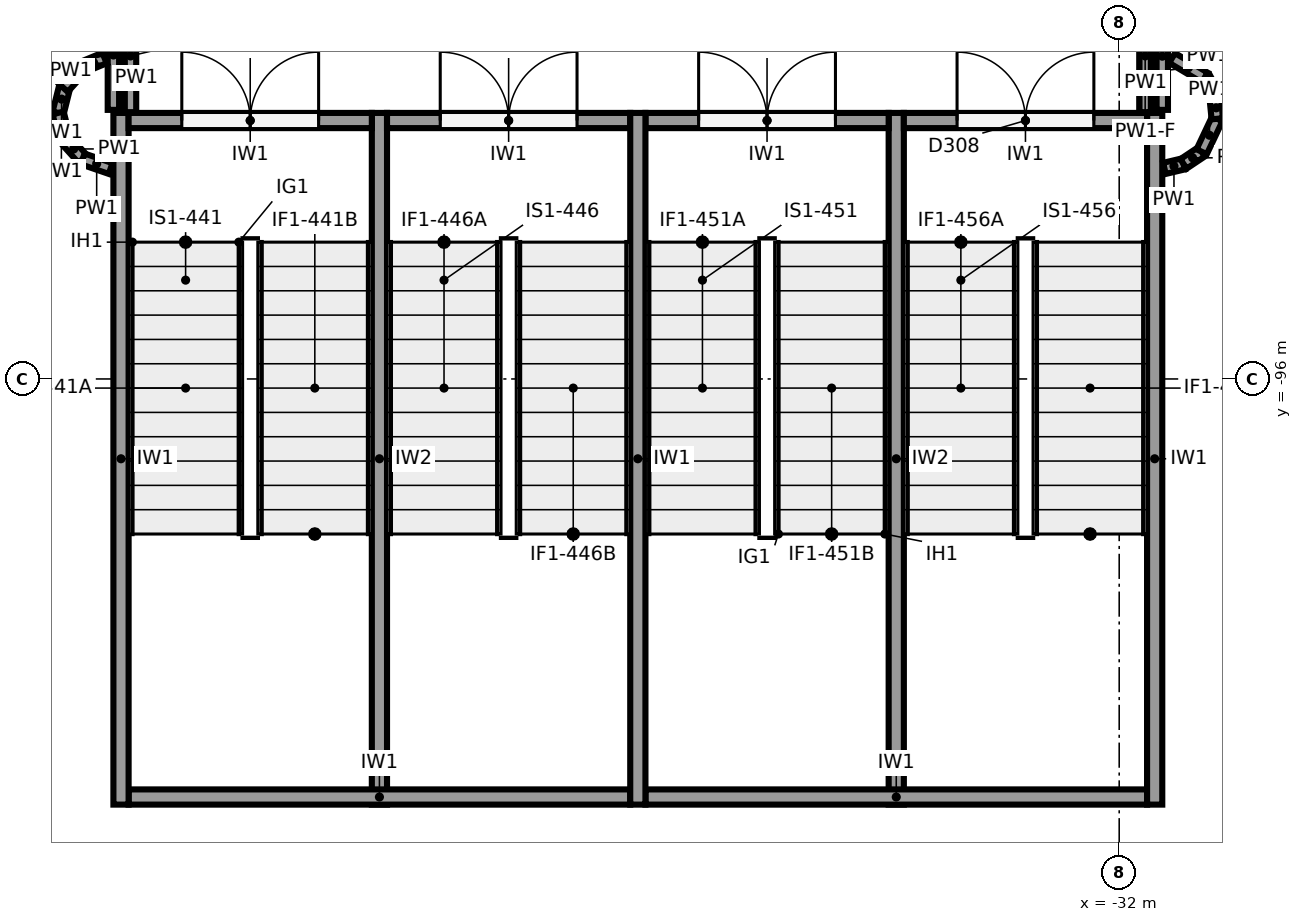
"""IFC4 building model, lengths in metres.
Left out: names, types, materials, properties, quantities, classifications, styles, units other than length and angle.
Written with IfcOpenShell. Run it as: python <this file> out.ifc"""

import sys

from ifc_helpers import new_model, si_unit, direction, frame, frame_2d, origin, place, context, subcontext, project, spatial, rectangle, extrude, element, fill, save


model = new_model("IFC4")
c1 = context("Model", 3, precision=1e-05, world=origin(), true_north=direction((0.0, 1.0)))
c2 = subcontext(c1, "Body", "Model", "MODEL_VIEW")
j1 = project(units=[si_unit("LENGTHUNIT", "METRE"), si_unit("PLANEANGLEUNIT", "RADIAN")], contexts=[c1])
p1 = place(None, origin())
s1 = spatial("IfcSite", under=j1, at=p1, CompositionType="ELEMENT")
p2 = place(p1, origin())
s2 = spatial("IfcBuilding", under=s1, at=p2, CompositionType="ELEMENT")
p3 = place(p2, frame((0.0, 0.0, -4.0)))
s3 = spatial("IfcBuildingStorey", under=s2, at=p3, CompositionType="ELEMENT", Elevation=-4.0)
for number, where, z_axis, x_axis in (
    (1, (-45.133, -101.6, -1.2), (0.0, 0.0, 1.0), (0.0, 1.0, 0.0)),
    (2, (-38.333, -101.6, -1.2), (0.0, 0.0, 1.0), (0.0, 1.0, 0.0)),
    (3, (-31.533, -101.6, -1.2), (0.0, 0.0, 1.0), (0.0, 1.0, 0.0)),
):
    element("IfcWall", number, at=place(p3, frame(where, z_axis=z_axis, x_axis=x_axis)), inside=s3, PredefinedType="SHEAR", context=c2, shape_type="SweptSolid", body=[
        extrude(rectangle(XDim=9.1, YDim=0.2, at=frame_2d((4.55, 0.0))), origin(), (0.0, 0.0, 1.0), 4.8),
    ])
p4 = place(p3, frame((-45.033, -101.5, -1.2), z_axis=(0.0, 0.0, 1.0), x_axis=(1.0, 0.0, 0.0)))
e4 = element("IfcWall", 4, at=p4, inside=s3, PredefinedType="SHEAR", context=c2, shape_type="SweptSolid", body=[
    extrude(rectangle(XDim=6.6, YDim=0.2, at=frame_2d((3.3, 0.0))), origin(), (0.0, 0.0, 1.0), 4.8),
])
p5 = place(p3, frame((-38.233, -101.5, -1.2), z_axis=(0.0, 0.0, 1.0), x_axis=(1.0, 0.0, 0.0)))
e5 = element("IfcWall", 5, at=p5, inside=s3, PredefinedType="SHEAR", context=c2, shape_type="SweptSolid", body=[
    extrude(rectangle(XDim=6.6, YDim=0.2, at=frame_2d((3.3, 0.0))), origin(), (0.0, 0.0, 1.0), 4.8),
])
for number, where, z_axis, x_axis in (
    (6, (-41.733, -101.6, -1.2), (0.0, 0.0, 1.0), (0.0, 1.0, 0.0)),
    (7, (-34.933, -101.6, -1.2), (0.0, 0.0, 1.0), (0.0, 1.0, 0.0)),
):
    element("IfcWall", number, at=place(p3, frame(where, z_axis=z_axis, x_axis=x_axis)), inside=s3, PredefinedType="SHEAR", context=c2, shape_type="SweptSolid", body=[
        extrude(rectangle(XDim=9.1, YDim=0.2, at=frame_2d((4.55, 0.0))), origin(), (0.0, 0.0, 1.0), 4.8),
    ])
p6 = place(p3, frame((-45.033, -92.6, -1.2), z_axis=(0.0, 0.0, 1.0), x_axis=(1.0, 0.0, 0.0)))
e8 = element("IfcWall", 8, at=p6, inside=s3, PredefinedType="SHEAR", context=c2, shape_type="SweptSolid", body=[
    extrude(rectangle(XDim=3.2, YDim=0.2, at=frame_2d((1.6, 0.0))), origin(), (0.0, 0.0, 1.0), 4.8),
])
p7 = place(p6, frame((0.7, 0.0, 1.2)))
e9 = element("IfcOpeningElement", 9, at=p7, cuts=e8, PredefinedType="OPENING", context=c2, shape_type="SweptSolid", body=[
    extrude(rectangle(XDim=1.8, YDim=2.1, at=frame_2d((0.9, 1.05))), frame((0.0, 0.11, 0.0), z_axis=(0.0, -1.0, 0.0), x_axis=(1.0, 0.0, 0.0)), (0.0, 0.0, 1.0), 0.22),
])
p8 = place(p3, frame((-41.633, -92.6, -1.2), z_axis=(0.0, 0.0, 1.0), x_axis=(1.0, 0.0, 0.0)))
e10 = element("IfcWall", 10, at=p8, inside=s3, PredefinedType="SHEAR", context=c2, shape_type="SweptSolid", body=[
    extrude(rectangle(XDim=3.2, YDim=0.2, at=frame_2d((1.6, 0.0))), origin(), (0.0, 0.0, 1.0), 4.8),
])
p9 = place(p8, frame((0.7, 0.0, 1.2)))
e11 = element("IfcOpeningElement", 11, at=p9, cuts=e10, PredefinedType="OPENING", context=c2, shape_type="SweptSolid", body=[
    extrude(rectangle(XDim=1.8, YDim=2.1, at=frame_2d((0.9, 1.05))), frame((0.0, 0.11, 0.0), z_axis=(0.0, -1.0, 0.0), x_axis=(1.0, 0.0, 0.0)), (0.0, 0.0, 1.0), 0.22),
])
p10 = place(p3, frame((-38.233, -92.6, -1.2), z_axis=(0.0, 0.0, 1.0), x_axis=(1.0, 0.0, 0.0)))
e12 = element("IfcWall", 12, at=p10, inside=s3, PredefinedType="SHEAR", context=c2, shape_type="SweptSolid", body=[
    extrude(rectangle(XDim=3.2, YDim=0.2, at=frame_2d((1.6, 0.0))), origin(), (0.0, 0.0, 1.0), 4.8),
])
p11 = place(p10, frame((0.7, 0.0, 1.2)))
e13 = element("IfcOpeningElement", 13, at=p11, cuts=e12, PredefinedType="OPENING", context=c2, shape_type="SweptSolid", body=[
    extrude(rectangle(XDim=1.8, YDim=2.1, at=frame_2d((0.9, 1.05))), frame((0.0, 0.11, 0.0), z_axis=(0.0, -1.0, 0.0), x_axis=(1.0, 0.0, 0.0)), (0.0, 0.0, 1.0), 0.22),
])
p12 = place(p3, frame((-34.833, -92.6, -1.2), z_axis=(0.0, 0.0, 1.0), x_axis=(1.0, 0.0, 0.0)))
e14 = element("IfcWall", 14, at=p12, inside=s3, PredefinedType="SHEAR", context=c2, shape_type="SweptSolid", body=[
    extrude(rectangle(XDim=3.2, YDim=0.2, at=frame_2d((1.6, 0.0))), origin(), (0.0, 0.0, 1.0), 4.8),
])
p13 = place(p12, frame((0.7, 0.0, 1.2)))
e15 = element("IfcOpeningElement", 15, at=p13, cuts=e14, PredefinedType="OPENING", context=c2, shape_type="SweptSolid", body=[
    extrude(rectangle(XDim=1.8, YDim=2.1, at=frame_2d((0.9, 1.05))), frame((0.0, 0.11, 0.0), z_axis=(0.0, -1.0, 0.0), x_axis=(1.0, 0.0, 0.0)), (0.0, 0.0, 1.0), 0.22),
])
p14 = place(p3, frame((-45.233, -91.016, 0.0), z_axis=(0.0, 0.0, 1.0), x_axis=(0.0, -1.0, 0.0)))
e16 = element("IfcWall", 16, at=p14, inside=s3, PredefinedType="PARTITIONING", context=c2, shape_type="SweptSolid", body=[
    extrude(rectangle(XDim=1.444, YDim=0.15, at=frame_2d((0.722, 0.0))), origin(), (0.0, 0.0, 1.0), 3.6),
])
p15 = place(p3, frame((-31.433, -92.46, 0.0), z_axis=(0.0, 0.0, 1.0), x_axis=(0.0, 1.0, 0.0)))
e17 = element("IfcWall", 17, at=p15, inside=s3, PredefinedType="PARTITIONING", context=c2, shape_type="SweptSolid", body=[
    extrude(rectangle(XDim=1.413, YDim=0.15, at=frame_2d((0.706, 0.0))), origin(), (0.0, 0.0, 1.0), 3.6),
])
p16 = place(p3, frame((-31.658, -92.49, 0.0), z_axis=(0.0, 0.0, 1.0), x_axis=(0.0, 1.0, 0.0)))
e18 = element("IfcWall", 18, at=p16, inside=s3, PredefinedType="PARTITIONING", context=c2, shape_type="SweptSolid", body=[
    extrude(rectangle(XDim=2.465, YDim=0.15, at=frame_2d((1.232, 0.0))), origin(), (0.0, 0.0, 1.0), 2.5),
])
p17 = place(p3, frame((-31.658, -92.49, 2.5), z_axis=(0.0, 0.0, 1.0), x_axis=(0.0, 1.0, 0.0)))
e19 = element("IfcWall", 19, at=p17, inside=s3, PredefinedType="PARTITIONING", context=c2, shape_type="SweptSolid", body=[
    extrude(rectangle(XDim=1.479, YDim=0.15, at=frame_2d((0.74, 0.0))), origin(), (0.0, 0.0, 1.0), 1.1),
])
p18 = place(p3, frame((-45.008, -91.011, 0.0), z_axis=(0.0, 0.0, 1.0), x_axis=(0.0, -1.0, 0.0)))
e20 = element("IfcWall", 20, at=p18, inside=s3, PredefinedType="PARTITIONING", context=c2, shape_type="SweptSolid", body=[
    extrude(rectangle(XDim=1.479, YDim=0.15, at=frame_2d((0.74, 0.0))), origin(), (0.0, 0.0, 1.0), 3.6),
])
p19 = place(p3, frame((-45.87, -92.137, 0.0), z_axis=(0.0, 0.0, 1.0), x_axis=(-0.243149105267, -0.969988923961, 0.0)))
e21 = element("IfcWall", 21, at=p19, inside=s3, PredefinedType="PARTITIONING", context=c2, shape_type="SweptSolid", body=[
    extrude(rectangle(XDim=0.375, YDim=0.15, at=frame_2d((0.187, 0.0))), origin(), (0.0, 0.0, 1.0), 3.6),
])
p20 = place(p3, frame((-45.961, -92.5, 0.0), z_axis=(0.0, 0.0, 1.0), x_axis=(0.243185799972, -0.969979724887, 0.0)))
e22 = element("IfcWall", 22, at=p20, inside=s3, PredefinedType="PARTITIONING", context=c2, shape_type="SweptSolid", body=[
    extrude(rectangle(XDim=0.353, YDim=0.15, at=frame_2d((0.177, 0.0))), origin(), (0.0, 0.0, 1.0), 3.6),
])
p21 = place(p3, frame((-45.875, -92.843, 0.0), z_axis=(0.0, 0.0, 1.0), x_axis=(0.671779735796, -0.740750961237, 0.0)))
e23 = element("IfcWall", 23, at=p21, inside=s3, PredefinedType="PARTITIONING", context=c2, shape_type="SweptSolid", body=[
    extrude(rectangle(XDim=0.354, YDim=0.15, at=frame_2d((0.177, 0.0))), origin(), (0.0, 0.0, 1.0), 3.6),
])
p22 = place(p3, frame((-45.637, -93.105, 0.0), z_axis=(0.0, 0.0, 1.0), x_axis=(0.945426446164, -0.325835594885, 0.0)))
e24 = element("IfcWall", 24, at=p22, inside=s3, PredefinedType="PARTITIONING", context=c2, shape_type="SweptSolid", body=[
    extrude(rectangle(XDim=0.388, YDim=0.15, at=frame_2d((0.194, 0.0))), origin(), (0.0, 0.0, 1.0), 3.6),
])
p23 = place(p3, frame((-31.405, -93.23, 0.0), z_axis=(0.0, 0.0, 1.0), x_axis=(0.973130593004, 0.230253879357, 0.0)))
e25 = element("IfcWall", 25, at=p23, inside=s3, PredefinedType="PARTITIONING", context=c2, shape_type="SweptSolid", body=[
    extrude(rectangle(XDim=0.258, YDim=0.15, at=frame_2d((0.129, 0.0))), origin(), (0.0, 0.0, 1.0), 3.6),
])
p24 = place(p3, frame((-31.154, -93.17, 0.0), z_axis=(0.0, 0.0, 1.0), x_axis=(0.831397130511, 0.555678694372, 0.0)))
e26 = element("IfcWall", 26, at=p24, inside=s3, PredefinedType="PARTITIONING", context=c2, shape_type="SweptSolid", body=[
    extrude(rectangle(XDim=0.288, YDim=0.15, at=frame_2d((0.144, 0.0))), origin(), (0.0, 0.0, 1.0), 3.6),
])
p25 = place(p3, frame((-30.915, -93.01, 0.0), z_axis=(0.0, 0.0, 1.0), x_axis=(0.427757963167, 0.903893315025, 0.0)))
e27 = element("IfcWall", 27, at=p25, inside=s3, PredefinedType="PARTITIONING", context=c2, shape_type="SweptSolid", body=[
    extrude(rectangle(XDim=0.479, YDim=0.15, at=frame_2d((0.24, 0.0))), origin(), (0.0, 0.0, 1.0), 3.6),
])
p26 = place(p3, frame((-30.71, -92.577, 0.0), z_axis=(0.0, 0.0, 1.0), x_axis=(-0.0978334953, 0.99520279702, 0.0)))
e28 = element("IfcWall", 28, at=p26, inside=s3, PredefinedType="PARTITIONING", context=c2, shape_type="SweptSolid", body=[
    extrude(rectangle(XDim=0.29, YDim=0.15, at=frame_2d((0.145, 0.0))), origin(), (0.0, 0.0, 1.0), 3.6),
])
p27 = place(p3, frame((-30.738, -92.289, 0.0), z_axis=(0.0, 0.0, 1.0), x_axis=(-0.471682765858, 0.881768319, 0.0)))
e29 = element("IfcWall", 29, at=p27, inside=s3, PredefinedType="PARTITIONING", context=c2, shape_type="SweptSolid", body=[
    extrude(rectangle(XDim=0.289, YDim=0.15, at=frame_2d((0.145, 0.0))), origin(), (0.0, 0.0, 1.0), 3.6),
])
p28 = place(p3, frame((-30.875, -92.034, 0.0), z_axis=(0.0, 0.0, 1.0), x_axis=(-0.85856712863, 0.512701166017, 0.0)))
e30 = element("IfcWall", 30, at=p28, inside=s3, PredefinedType="PARTITIONING", context=c2, shape_type="SweptSolid", body=[
    extrude(rectangle(XDim=0.5, YDim=0.15, at=frame_2d((0.25, 0.0))), origin(), (0.0, 0.0, 1.0), 3.6),
])
p29 = place(p3, frame((-45.35, -91.778, 0.0), z_axis=(0.0, 0.0, 1.0), x_axis=(-0.924710471816, -0.380671174788, 0.0)))
e31 = element("IfcWall", 31, at=p29, inside=s3, PredefinedType="PARTITIONING", context=c2, shape_type="SweptSolid", body=[
    extrude(rectangle(XDim=0.312, YDim=0.15, at=frame_2d((0.156, 0.0))), origin(), (0.0, 0.0, 1.0), 3.6),
])
p30 = place(p3, frame((-45.639, -91.896, 0.0), z_axis=(0.0, 0.0, 1.0), x_axis=(-0.671204763042, -0.741271991964, 0.0)))
e32 = element("IfcWall", 32, at=p30, inside=s3, PredefinedType="PARTITIONING", context=c2, shape_type="SweptSolid", body=[
    extrude(rectangle(XDim=0.373, YDim=0.15, at=frame_2d((0.187, 0.0))), origin(), (0.0, 0.0, 1.0), 3.6),
])
p31 = place(p7, origin())
e33 = element("IfcDoor", 33, at=p31, inside=s3, OperationType="DOUBLE_DOOR_SINGLE_SWING", PredefinedType="DOOR", context=c2, shape_type="SweptSolid", body=[
    extrude(rectangle(XDim=1.8, YDim=2.1, at=frame_2d((0.9, 1.05))), frame((0.0, 0.025, 0.0), z_axis=(0.0, -1.0, 0.0), x_axis=(1.0, 0.0, 0.0)), (0.0, 0.0, 1.0), 0.05),
])
fill(e9, e33)
p32 = place(p9, origin())
e34 = element("IfcDoor", 34, at=p32, inside=s3, OperationType="DOUBLE_DOOR_SINGLE_SWING", PredefinedType="DOOR", context=c2, shape_type="SweptSolid", body=[
    extrude(rectangle(XDim=1.8, YDim=2.1, at=frame_2d((0.9, 1.05))), frame((0.0, 0.025, 0.0), z_axis=(0.0, -1.0, 0.0), x_axis=(1.0, 0.0, 0.0)), (0.0, 0.0, 1.0), 0.05),
])
fill(e11, e34)
p33 = place(p11, origin())
e35 = element("IfcDoor", 35, at=p33, inside=s3, OperationType="DOUBLE_DOOR_SINGLE_SWING", PredefinedType="DOOR", context=c2, shape_type="SweptSolid", body=[
    extrude(rectangle(XDim=1.8, YDim=2.1, at=frame_2d((0.9, 1.05))), frame((0.0, 0.025, 0.0), z_axis=(0.0, -1.0, 0.0), x_axis=(1.0, 0.0, 0.0)), (0.0, 0.0, 1.0), 0.05),
])
fill(e13, e35)
p34 = place(p13, origin())
e36 = element("IfcDoor", 36, at=p34, inside=s3, OperationType="DOUBLE_DOOR_SINGLE_SWING", PredefinedType="DOOR", context=c2, shape_type="SweptSolid", body=[
    extrude(rectangle(XDim=1.8, YDim=2.1, at=frame_2d((0.9, 1.05))), frame((0.0, 0.025, 0.0), z_axis=(0.0, -1.0, 0.0), x_axis=(1.0, 0.0, 0.0)), (0.0, 0.0, 1.0), 0.05),
])
fill(e15, e36)
save(model, sys.argv[1])
